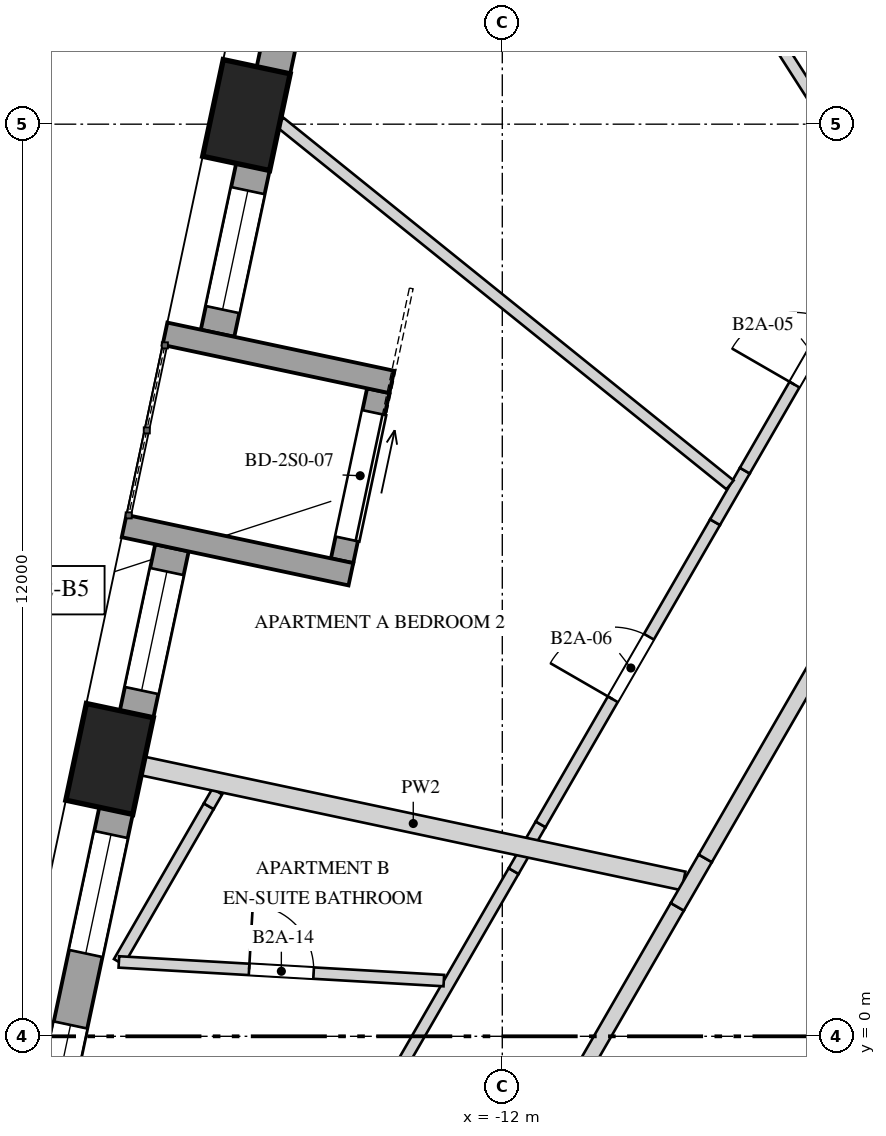
"""IFC4 building model, lengths in metres.
Left out: names, types, materials, properties, quantities, classifications, styles, units other than length and angle.
Written with IfcOpenShell. Run it as: python <this file> out.ifc"""

import sys

from ifc_helpers import new_model, si_unit, direction, frame, frame_2d, origin, origin_2d, place, context, subcontext, project, spatial, rectangle, extrude, element, fill, save


model = new_model("IFC4")
c1 = context("Model", 3, precision=1e-05, world=origin(), true_north=direction((0.0, 1.0)))
c2 = subcontext(c1, "Body", "Model", "MODEL_VIEW")
j1 = project(units=[si_unit("LENGTHUNIT", "METRE"), si_unit("PLANEANGLEUNIT", "RADIAN")], contexts=[c1])
p1 = place(None, origin())
s1 = spatial("IfcSite", under=j1, at=p1, CompositionType="ELEMENT")
p2 = place(p1, origin())
s2 = spatial("IfcBuilding", under=s1, at=p2, CompositionType="ELEMENT")
p3 = place(p2, frame((0.0, 0.0, 88.4)))
s3 = spatial("IfcBuildingStorey", under=s2, at=p3, CompositionType="ELEMENT", Elevation=88.4)
p4 = place(p3, frame((-1.169, 10.525, 0.0), z_axis=(0.0, 0.0, 1.0), x_axis=(-0.499999102847, -0.866025921755, 0.0)))
e1 = element("IfcWall", 1, at=p4, inside=s3, PredefinedType="SHEAR", context=c2, shape_type="SweptSolid", body=[
    extrude(rectangle(XDim=17.061, YDim=0.95, at=frame_2d((8.53, 0.0))), origin(), (0.0, 0.0, 1.0), 4.0),
])
p5 = place(p4, frame((6.735, 0.0, 0.0)))
e2 = element("IfcOpeningElement", 2, at=p5, cuts=e1, PredefinedType="OPENING", context=c2, shape_type="SweptSolid", body=[
    extrude(rectangle(XDim=1.0, YDim=2.4, at=frame_2d((0.5, 1.2))), frame((0.0, 0.485, 0.0), z_axis=(0.0, -1.0, 0.0), x_axis=(1.0, 0.0, 0.0)), (0.0, 0.0, 1.0), 0.97),
])
p6 = place(p4, frame((14.613, 0.0, 0.0)))
e3 = element("IfcOpeningElement", 3, at=p6, cuts=e1, PredefinedType="OPENING", context=c2, shape_type="SweptSolid", body=[
    extrude(rectangle(XDim=0.8, YDim=2.1, at=frame_2d((0.4, 1.05))), frame((0.0, 0.485, 0.0), z_axis=(0.0, -1.0, 0.0), x_axis=(1.0, 0.0, 0.0)), (0.0, 0.0, 1.0), 0.97),
])
for number, where, z_axis, x_axis in (
    (4, (-15.366, 12.12, -0.35), (0.0, 0.0, 1.0), (-0.208, -0.978, 0.0)),
    (5, (-17.167, 3.649, -0.35), (0.0, 0.0, 1.0), (-0.208, -0.978, 0.0)),
):
    element("IfcColumn", number, at=place(p3, frame(where, z_axis=z_axis, x_axis=x_axis)), inside=s3, PredefinedType="COLUMN", context=c2, shape_type="SweptSolid", body=[
        extrude(rectangle(XDim=1.3, YDim=0.9, at=origin_2d()), origin(), (0.0, 0.0, 1.0), 4.35),
    ])
p7 = place(p3, frame((-14.546, 14.897, 0.0), z_axis=(0.0, 0.0, 1.0), x_axis=(-0.207941001029, -0.978141370197, 0.0)))
e6 = element("IfcWall", 6, at=p7, inside=s3, PredefinedType="SOLIDWALL", context=c2, shape_type="SweptSolid", body=[
    extrude(rectangle(XDim=2.237, YDim=0.45, at=frame_2d((1.118, 0.0))), origin(), (0.0, 0.0, 1.0), 3.3),
])
p8 = place(p7, frame((0.318, 0.0, 0.7)))
e7 = element("IfcOpeningElement", 7, at=p8, cuts=e6, PredefinedType="OPENING", context=c2, shape_type="SweptSolid", body=[
    extrude(rectangle(XDim=1.6, YDim=2.3, at=frame_2d((0.8, 1.15))), frame((0.0, 0.235, 0.0), z_axis=(0.0, -1.0, 0.0), x_axis=(1.0, 0.0, 0.0)), (0.0, 0.0, 1.0), 0.47),
])
p9 = place(p3, frame((-15.281, 11.437, 0.0), z_axis=(0.0, 0.0, 1.0), x_axis=(-0.207941001029, -0.978141370197, 0.0)))
e8 = element("IfcWall", 8, at=p9, inside=s3, PredefinedType="SOLIDWALL", context=c2, shape_type="SweptSolid", body=[
    extrude(rectangle(XDim=2.237, YDim=0.45, at=frame_2d((1.118, 0.0))), origin(), (0.0, 0.0, 1.0), 3.3),
])
p10 = place(p9, frame((0.318, 0.0, 0.7)))
e9 = element("IfcOpeningElement", 9, at=p10, cuts=e8, PredefinedType="OPENING", context=c2, shape_type="SweptSolid", body=[
    extrude(rectangle(XDim=1.6, YDim=2.3, at=frame_2d((0.8, 1.15))), frame((0.0, 0.235, 0.0), z_axis=(0.0, -1.0, 0.0), x_axis=(1.0, 0.0, 0.0)), (0.0, 0.0, 1.0), 0.47),
])
p11 = place(p3, frame((-16.346, 6.426, 0.0), z_axis=(0.0, 0.0, 1.0), x_axis=(-0.207918801611, -0.978146089261, 0.0)))
e10 = element("IfcWall", 10, at=p11, inside=s3, PredefinedType="SOLIDWALL", context=c2, shape_type="SweptSolid", body=[
    extrude(rectangle(XDim=2.237, YDim=0.45, at=frame_2d((1.118, 0.0))), origin(), (0.0, 0.0, 1.0), 3.3),
])
p12 = place(p11, frame((0.318, 0.0, 0.7)))
e11 = element("IfcOpeningElement", 11, at=p12, cuts=e10, PredefinedType="OPENING", context=c2, shape_type="SweptSolid", body=[
    extrude(rectangle(XDim=1.6, YDim=2.3, at=frame_2d((0.8, 1.15))), frame((0.0, 0.235, 0.0), z_axis=(0.0, -1.0, 0.0), x_axis=(1.0, 0.0, 0.0)), (0.0, 0.0, 1.0), 0.47),
])
p13 = place(p3, frame((-17.082, 2.966, 0.0), z_axis=(0.0, 0.0, 1.0), x_axis=(-0.207909137741, -0.978148143403, 0.0)))
e12 = element("IfcWall", 12, at=p13, inside=s3, PredefinedType="SOLIDWALL", context=c2, shape_type="SweptSolid", body=[
    extrude(rectangle(XDim=7.36, YDim=0.45, at=frame_2d((3.68, 0.0))), origin(), (0.0, 0.0, 1.0), 3.3),
])
p14 = place(p13, frame((0.318, 0.0, 0.7)))
e13 = element("IfcOpeningElement", 13, at=p14, cuts=e12, PredefinedType="OPENING", context=c2, shape_type="SweptSolid", body=[
    extrude(rectangle(XDim=1.6, YDim=2.3, at=frame_2d((0.8, 1.15))), frame((0.0, 0.235, 0.0), z_axis=(0.0, -1.0, 0.0), x_axis=(1.0, 0.0, 0.0)), (0.0, 0.0, 1.0), 0.47),
])
p15 = place(p13, frame((2.88, 0.0, 0.7)))
e14 = element("IfcOpeningElement", 14, at=p15, cuts=e12, PredefinedType="OPENING", context=c2, shape_type="SweptSolid", body=[
    extrude(rectangle(XDim=1.6, YDim=2.3, at=frame_2d((0.8, 1.15))), frame((0.0, 0.235, 0.0), z_axis=(0.0, -1.0, 0.0), x_axis=(1.0, 0.0, 0.0)), (0.0, 0.0, 1.0), 0.47),
])
p16 = place(p13, frame((5.442, 0.0, 0.7)))
e15 = element("IfcOpeningElement", 15, at=p16, cuts=e12, PredefinedType="OPENING", context=c2, shape_type="SweptSolid", body=[
    extrude(rectangle(XDim=1.6, YDim=2.3, at=frame_2d((0.8, 1.15))), frame((0.0, 0.235, 0.0), z_axis=(0.0, -1.0, 0.0), x_axis=(1.0, 0.0, 0.0)), (0.0, 0.0, 1.0), 0.47),
])
p17 = place(p3, frame((-13.632, 8.493, 0.0), z_axis=(0.0, 0.0, 1.0), x_axis=(-0.207866417042, -0.978157222877, 0.0)))
e16 = element("IfcWall", 16, at=p17, inside=s3, PredefinedType="SOLIDWALL", context=c2, shape_type="SweptSolid", body=[
    extrude(rectangle(XDim=2.287, YDim=0.3, at=frame_2d((1.144, 0.0))), origin(), (0.0, 0.0, 1.0), 3.3),
])
p18 = place(p17, frame((0.293, 0.0, 0.0)))
e17 = element("IfcOpeningElement", 17, at=p18, cuts=e16, PredefinedType="OPENING", context=c2, shape_type="SweptSolid", body=[
    extrude(rectangle(XDim=1.7, YDim=2.4, at=frame_2d((0.85, 1.2))), frame((0.0, 0.16, 0.0), z_axis=(0.0, -1.0, 0.0), x_axis=(1.0, 0.0, 0.0)), (0.0, 0.0, 1.0), 0.32),
])
for number, where, z_axis, x_axis in (
    (18, (-16.438, 9.243, 0.0), (0.0, 0.0, 1.0), (0.978, -0.208, 0.0)),
    (19, (-16.975, 6.713, 0.0), (0.0, 0.0, 1.0), (0.978, -0.208, 0.0)),
):
    element("IfcWall", number, at=place(p3, frame(where, z_axis=z_axis, x_axis=x_axis)), inside=s3, PredefinedType="SOLIDWALL", context=c2, shape_type="SweptSolid", body=[
        extrude(rectangle(XDim=3.05, YDim=0.3, at=frame_2d((1.525, 0.0))), origin(), (0.0, 0.0, 1.0), 3.3),
    ])
p19 = place(p3, frame((-17.044, 0.979, 0.0), z_axis=(0.0, 0.0, 1.0), x_axis=(0.499969694265, 0.866042900102, 0.0)))
e20 = element("IfcWall", 20, at=p19, inside=s3, PredefinedType="PARTITIONING", context=c2, shape_type="SweptSolid", body=[
    extrude(rectangle(XDim=2.365, YDim=0.15, at=frame_2d((1.183, 0.0))), origin(), (0.0, 0.0, 1.0), 3.65),
])
p20 = place(p3, frame((-15.862, 3.027, 0.0), z_axis=(0.0, 0.0, 1.0), x_axis=(0.500605348058, 0.865675623716, 0.0)))
e21 = element("IfcWall", 21, at=p20, inside=s3, PredefinedType="PARTITIONING", context=c2, shape_type="SweptSolid", body=[
    extrude(rectangle(XDim=0.223, YDim=0.15, at=frame_2d((0.112, 0.0))), origin(), (0.0, 0.0, 1.0), 2.95),
])
p21 = place(p3, frame((-15.125, -3.497, 0.0), z_axis=(0.0, 0.0, 1.0), x_axis=(0.500008610982, 0.866020432175, 0.0)))
e22 = element("IfcWall", 22, at=p21, inside=s3, PredefinedType="PARTITIONING", context=c2, shape_type="SweptSolid", body=[
    extrude(rectangle(XDim=6.548, YDim=0.15, at=frame_2d((3.274, 0.0))), origin(), (0.0, 0.0, 1.0), 3.65),
])
p22 = place(p21, frame((1.551, 0.0, 0.0)))
e23 = element("IfcOpeningElement", 23, at=p22, cuts=e22, PredefinedType="OPENING", context=c2, shape_type="SweptSolid", body=[
    extrude(rectangle(XDim=0.95, YDim=2.4, at=frame_2d((0.475, 1.2))), frame((0.0, 0.085, 0.0), z_axis=(0.0, -1.0, 0.0), x_axis=(1.0, 0.0, 0.0)), (0.0, 0.0, 1.0), 0.17),
])
p23 = place(p3, frame((-11.851, 2.174, 0.0), z_axis=(0.0, 0.0, 1.0), x_axis=(0.500059846627, 0.865990848561, 0.0)))
e24 = element("IfcWall", 24, at=p23, inside=s3, PredefinedType="PARTITIONING", context=c2, shape_type="SweptSolid", body=[
    extrude(rectangle(XDim=0.71, YDim=0.15, at=frame_2d((0.355, 0.0))), origin(), (0.0, 0.0, 1.0), 2.95),
])
p24 = place(p3, frame((-11.496, 2.789, 0.0), z_axis=(0.0, 0.0, 1.0), x_axis=(0.499983361514, 0.866035009806, 0.0)))
e25 = element("IfcWall", 25, at=p24, inside=s3, PredefinedType="PARTITIONING", context=c2, shape_type="SweptSolid", body=[
    extrude(rectangle(XDim=4.59, YDim=0.15, at=frame_2d((2.295, 0.0))), origin(), (0.0, 0.0, 1.0), 3.65),
])
p25 = place(p24, frame((1.9, 0.0, 0.0)))
e26 = element("IfcOpeningElement", 26, at=p25, cuts=e25, PredefinedType="OPENING", context=c2, shape_type="SweptSolid", body=[
    extrude(rectangle(XDim=0.95, YDim=2.4, at=frame_2d((0.475, 1.2))), frame((0.0, 0.085, 0.0), z_axis=(0.0, -1.0, 0.0), x_axis=(1.0, 0.0, 0.0)), (0.0, 0.0, 1.0), 0.17),
])
p26 = place(p3, frame((-9.201, 6.764, 0.0), z_axis=(0.0, 0.0, 1.0), x_axis=(0.500028278809, 0.866009076391, 0.0)))
e27 = element("IfcWall", 27, at=p26, inside=s3, PredefinedType="PARTITIONING", context=c2, shape_type="SweptSolid", body=[
    extrude(rectangle(XDim=0.783, YDim=0.15, at=frame_2d((0.392, 0.0))), origin(), (0.0, 0.0, 1.0), 2.75),
])
p27 = place(p3, frame((-8.809, 7.442, 0.0), z_axis=(0.0, 0.0, 1.0), x_axis=(0.500003371769, 0.866023457084, 0.0)))
e28 = element("IfcWall", 28, at=p27, inside=s3, PredefinedType="PARTITIONING", context=c2, shape_type="SweptSolid", body=[
    extrude(rectangle(XDim=3.16, YDim=0.15, at=frame_2d((1.58, 0.0))), origin(), (0.0, 0.0, 1.0), 3.65),
])
p28 = place(p27, frame((1.307, 0.0, 0.0)))
e29 = element("IfcOpeningElement", 29, at=p28, cuts=e28, PredefinedType="OPENING", context=c2, shape_type="SweptSolid", body=[
    extrude(rectangle(XDim=0.95, YDim=2.4, at=frame_2d((0.475, 1.2))), frame((0.0, 0.085, 0.0), z_axis=(0.0, -1.0, 0.0), x_axis=(1.0, 0.0, 0.0)), (0.0, 0.0, 1.0), 0.17),
])
p29 = place(p3, frame((-17.044, 0.979, 0.0), z_axis=(0.0, 0.0, 1.0), x_axis=(0.998356921025, -0.057301468054, 0.0)))
e30 = element("IfcWall", 30, at=p29, inside=s3, PredefinedType="PARTITIONING", context=c2, shape_type="SweptSolid", body=[
    extrude(rectangle(XDim=4.282, YDim=0.15, at=frame_2d((2.141, 0.0))), origin(), (0.0, 0.0, 1.0), 3.65),
])
p30 = place(p29, frame((1.716, 0.0, 0.0)))
e31 = element("IfcOpeningElement", 31, at=p30, cuts=e30, PredefinedType="OPENING", context=c2, shape_type="SweptSolid", body=[
    extrude(rectangle(XDim=0.85, YDim=2.4, at=frame_2d((0.425, 1.2))), frame((0.0, 0.085, 0.0), z_axis=(0.0, -1.0, 0.0), x_axis=(1.0, 0.0, 0.0)), (0.0, 0.0, 1.0), 0.17),
])
p31 = place(p3, frame((-9.616, 2.044, 0.0), z_axis=(0.0, 0.0, 1.0), x_axis=(-0.978148093834, 0.207909370951, 0.0)))
e32 = element("IfcWall", 32, at=p31, inside=s3, PredefinedType="SOLIDWALL", context=c2, shape_type="SweptSolid", body=[
    extrude(rectangle(XDim=7.269, YDim=0.25, at=frame_2d((3.634, 0.0))), origin(), (0.0, 0.0, 1.0), 2.95),
])
p32 = place(p3, frame((-9.004, 7.255, 0.0), z_axis=(0.0, 0.0, 1.0), x_axis=(-0.778684200607, 0.627416062692, 0.0)))
e33 = element("IfcWall", 33, at=p32, inside=s3, PredefinedType="PARTITIONING", context=c2, shape_type="SweptSolid", body=[
    extrude(rectangle(XDim=7.605, YDim=0.15, at=frame_2d((3.802, 0.0))), origin(), (0.0, 0.0, 1.0), 2.75),
])
p33 = place(p3, frame((-6.938, 10.834, 0.0), z_axis=(0.0, 0.0, 1.0), x_axis=(-0.539252318239, 0.842144249683, 0.0)))
e34 = element("IfcWall", 34, at=p33, inside=s3, PredefinedType="PARTITIONING", context=c2, shape_type="SweptSolid", body=[
    extrude(rectangle(XDim=11.475, YDim=0.15, at=frame_2d((5.737, 0.0))), origin(), (0.0, 0.0, 1.0), 2.55),
])
p34 = place(p3, frame((-6.366, 11.675, 0.0), z_axis=(0.0, 0.0, 1.0), x_axis=(-0.401014713365, 0.916071612738, 0.0)))
e35 = element("IfcWall", 35, at=p34, inside=s3, PredefinedType="PARTITIONING", context=c2, shape_type="SweptSolid", body=[
    extrude(rectangle(XDim=4.838, YDim=0.15, at=frame_2d((2.419, 0.0))), origin(), (0.0, 0.0, 1.0), 3.65),
])
p35 = place(p34, frame((1.994, 0.0, 0.0)))
e36 = element("IfcOpeningElement", 36, at=p35, cuts=e35, PredefinedType="OPENING", context=c2, shape_type="SweptSolid", body=[
    extrude(rectangle(XDim=0.85, YDim=2.4, at=frame_2d((0.425, 1.2))), frame((0.0, 0.085, 0.0), z_axis=(0.0, -1.0, 0.0), x_axis=(1.0, 0.0, 0.0)), (0.0, 0.0, 1.0), 0.17),
])
p36 = place(p3, frame((-12.274, -2.76, 0.0), z_axis=(0.0, 0.0, 1.0), x_axis=(0.500001317485, 0.866024643133, 0.0)))
e37 = element("IfcWall", 37, at=p36, inside=s3, PredefinedType="SOLIDWALL", context=c2, shape_type="SweptSolid", body=[
    extrude(rectangle(XDim=5.153, YDim=0.2, at=frame_2d((2.577, 0.0))), origin(), (0.0, 0.0, 1.0), 3.65),
])
p37 = place(p3, frame((-9.698, 1.703, 0.0), z_axis=(0.0, 0.0, 1.0), x_axis=(0.499885169746, 0.866091690913, 0.0)))
e38 = element("IfcWall", 38, at=p37, inside=s3, PredefinedType="SOLIDWALL", context=c2, shape_type="SweptSolid", body=[
    extrude(rectangle(XDim=0.736, YDim=0.2, at=frame_2d((0.368, 0.0))), origin(), (0.0, 0.0, 1.0), 2.95),
])
p38 = place(p3, frame((-9.33, 2.341, 0.0), z_axis=(0.0, 0.0, 1.0), x_axis=(0.500029679218, 0.866008267802, 0.0)))
e39 = element("IfcWall", 39, at=p38, inside=s3, PredefinedType="SOLIDWALL", context=c2, shape_type="SweptSolid", body=[
    extrude(rectangle(XDim=3.577, YDim=0.2, at=frame_2d((1.789, 0.0))), origin(), (0.0, 0.0, 1.0), 3.65),
])
p39 = place(p10, origin())
e40 = element("IfcWindow", 40, at=p39, inside=s3, PartitioningType="SINGLE_PANEL", PredefinedType="WINDOW", context=c2, shape_type="SweptSolid", body=[
    extrude(rectangle(XDim=1.6, YDim=2.3, at=frame_2d((0.8, 1.15))), frame((0.0, 0.03, 0.0), z_axis=(0.0, -1.0, 0.0), x_axis=(1.0, 0.0, 0.0)), (0.0, 0.0, 1.0), 0.06),
])
fill(e9, e40)
p40 = place(p12, origin())
e41 = element("IfcWindow", 41, at=p40, inside=s3, PartitioningType="SINGLE_PANEL", PredefinedType="WINDOW", context=c2, shape_type="SweptSolid", body=[
    extrude(rectangle(XDim=1.6, YDim=2.3, at=frame_2d((0.8, 1.15))), frame((0.0, 0.03, 0.0), z_axis=(0.0, -1.0, 0.0), x_axis=(1.0, 0.0, 0.0)), (0.0, 0.0, 1.0), 0.06),
])
fill(e11, e41)
p41 = place(p14, origin())
e42 = element("IfcWindow", 42, at=p41, inside=s3, PartitioningType="SINGLE_PANEL", PredefinedType="WINDOW", context=c2, shape_type="SweptSolid", body=[
    extrude(rectangle(XDim=1.6, YDim=2.3, at=frame_2d((0.8, 1.15))), frame((0.0, 0.03, 0.0), z_axis=(0.0, -1.0, 0.0), x_axis=(1.0, 0.0, 0.0)), (0.0, 0.0, 1.0), 0.06),
])
fill(e13, e42)
p42 = place(p15, origin())
e43 = element("IfcWindow", 43, at=p42, inside=s3, PartitioningType="SINGLE_PANEL", PredefinedType="WINDOW", context=c2, shape_type="SweptSolid", body=[
    extrude(rectangle(XDim=1.6, YDim=2.3, at=frame_2d((0.8, 1.15))), frame((0.0, 0.03, 0.0), z_axis=(0.0, -1.0, 0.0), x_axis=(1.0, 0.0, 0.0)), (0.0, 0.0, 1.0), 0.06),
])
fill(e14, e43)
p43 = place(p18, origin())
e44 = element("IfcDoor", 44, at=p43, inside=s3, OperationType="SLIDING_TO_LEFT", PredefinedType="DOOR", context=c2, shape_type="SweptSolid", body=[
    extrude(rectangle(XDim=1.7, YDim=2.4, at=frame_2d((0.85, 1.2))), frame((0.0, 0.025, 0.0), z_axis=(0.0, -1.0, 0.0), x_axis=(1.0, 0.0, 0.0)), (0.0, 0.0, 1.0), 0.05),
])
fill(e17, e44)
p44 = place(p28, origin())
e45 = element("IfcDoor", 45, at=p44, inside=s3, OperationType="SINGLE_SWING_LEFT", PredefinedType="DOOR", context=c2, shape_type="SweptSolid", body=[
    extrude(rectangle(XDim=0.95, YDim=2.4, at=frame_2d((0.475, 1.2))), frame((0.0, 0.025, 0.0), z_axis=(0.0, -1.0, 0.0), x_axis=(1.0, 0.0, 0.0)), (0.0, 0.0, 1.0), 0.05),
])
fill(e29, e45)
p45 = place(p25, origin())
e46 = element("IfcDoor", 46, at=p45, inside=s3, OperationType="SINGLE_SWING_RIGHT", PredefinedType="DOOR", context=c2, shape_type="SweptSolid", body=[
    extrude(rectangle(XDim=0.95, YDim=2.4, at=frame_2d((0.475, 1.2))), frame((0.0, 0.025, 0.0), z_axis=(0.0, -1.0, 0.0), x_axis=(1.0, 0.0, 0.0)), (0.0, 0.0, 1.0), 0.05),
])
fill(e26, e46)
p46 = place(p30, origin())
e47 = element("IfcDoor", 47, at=p46, inside=s3, OperationType="SINGLE_SWING_RIGHT", PredefinedType="DOOR", context=c2, shape_type="SweptSolid", body=[
    extrude(rectangle(XDim=0.85, YDim=2.4, at=frame_2d((0.425, 1.2))), frame((0.0, 0.025, 0.0), z_axis=(0.0, -1.0, 0.0), x_axis=(1.0, 0.0, 0.0)), (0.0, 0.0, 1.0), 0.05),
])
fill(e31, e47)
save(model, sys.argv[1])
